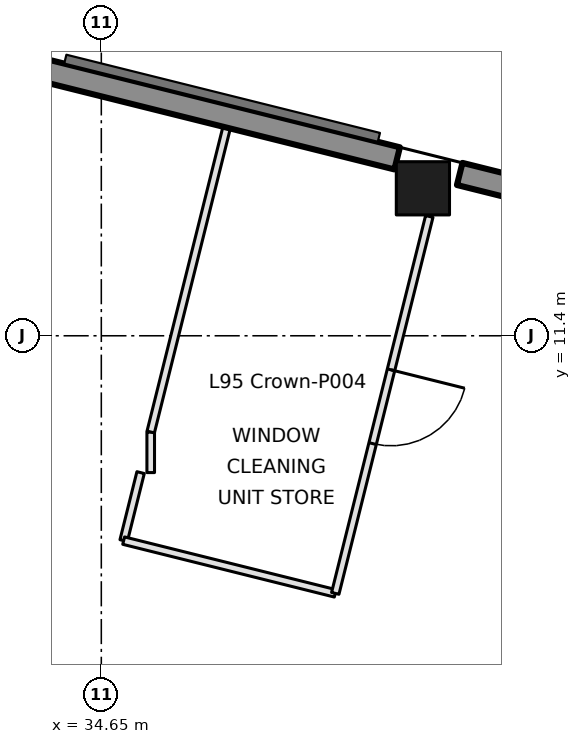
"""IFC4 building model, lengths in metres.
Left out: names, types, materials, properties, quantities, classifications, styles, units other than length and angle.
Written with IfcOpenShell. Run it as: python <this file> out.ifc"""

import sys

from ifc_helpers import new_model, si_unit, direction, frame, frame_2d, origin, origin_2d, place, context, subcontext, project, spatial, rectangle, extrude, element, fill, save


model = new_model("IFC4")
c1 = context("Model", 3, precision=1e-05, world=origin(), true_north=direction((0.0, 1.0)))
c2 = subcontext(c1, "Body", "Model", "MODEL_VIEW")
j1 = project(units=[si_unit("LENGTHUNIT", "METRE"), si_unit("PLANEANGLEUNIT", "RADIAN")], contexts=[c1])
p1 = place(None, origin())
s1 = spatial("IfcSite", under=j1, at=p1, CompositionType="ELEMENT")
p2 = place(p1, origin())
s2 = spatial("IfcBuilding", under=s1, at=p2, CompositionType="ELEMENT")
p3 = place(p2, frame((0.0, 0.0, 414.6)))
s3 = spatial("IfcBuildingStorey", under=s2, at=p3, CompositionType="ELEMENT", Elevation=414.6)
p4 = place(p3, frame((38.881, 13.34, 0.0), z_axis=(0.0, 0.0, 1.0), x_axis=(1.0, 0.0, 0.0)))
e1 = element("IfcColumn", 1, at=p4, inside=s3, PredefinedType="COLUMN", context=c2, shape_type="SweptSolid", body=[
    extrude(rectangle(XDim=0.7, YDim=0.7, at=origin_2d()), origin(), (0.0, 0.0, 1.0), 4.8),
])
p5 = place(p3, frame((37.639, -3.098, -0.3), z_axis=(0.0, 0.0, 1.0), x_axis=(0.241869030534, 0.970308905488, 0.0)))
e2 = element("IfcWall", 2, at=p5, inside=s3, PredefinedType="SHEAR", context=c2, shape_type="SweptSolid", body=[
    extrude(rectangle(XDim=10.601, YDim=0.4, at=frame_2d((5.3, 0.0))), origin(), (0.0, 0.0, 1.0), 4.65),
])
p6 = place(p5, frame((4.4, 0.0, 0.3)))
e3 = element("IfcOpeningElement", 3, at=p6, cuts=e2, PredefinedType="OPENING", context=c2, shape_type="SweptSolid", body=[
    extrude(rectangle(XDim=1.8, YDim=2.1, at=frame_2d((0.9, 1.05))), frame((0.0, 0.21, 0.0), z_axis=(0.0, -1.0, 0.0), x_axis=(1.0, 0.0, 0.0)), (0.0, 0.0, 1.0), 0.42),
])
p7 = place(p3, frame((34.944, 8.705, 0.0), z_axis=(0.0, 0.0, 1.0), x_axis=(0.241663601194, 0.97036008979, 0.0)))
e4 = element("IfcWall", 4, at=p7, inside=s3, PredefinedType="PARTITIONING", context=c2, shape_type="SweptSolid", body=[
    extrude(rectangle(XDim=0.922, YDim=0.1, at=frame_2d((0.461, 0.0))), origin(), (0.0, 0.0, 1.0), 4.35),
])
p8 = place(p3, frame((35.3, 9.6, 0.0), z_axis=(0.0, 0.0, 1.0), x_axis=(0.0, 1.0, 0.0)))
e5 = element("IfcWall", 5, at=p8, inside=s3, PredefinedType="PARTITIONING", context=c2, shape_type="SweptSolid", body=[
    extrude(rectangle(XDim=0.534, YDim=0.1, at=frame_2d((0.267, 0.0))), origin(), (0.0, 0.0, 1.0), 4.35),
])
p9 = place(p3, frame((35.3, 10.134, 0.0), z_axis=(0.0, 0.0, 1.0), x_axis=(0.24203457236, 0.970267625855, 0.0)))
e6 = element("IfcWall", 6, at=p9, inside=s3, PredefinedType="PARTITIONING", context=c2, shape_type="SweptSolid", body=[
    extrude(rectangle(XDim=4.128, YDim=0.1, at=frame_2d((2.064, 0.0))), origin(), (0.0, 0.0, 1.0), 4.35),
])
p10 = place(p3, frame((37.728, 8.011, 0.0), z_axis=(0.0, 0.0, 1.0), x_axis=(-0.970297468312, 0.241914908569, 0.0)))
e7 = element("IfcWall", 7, at=p10, inside=s3, PredefinedType="PARTITIONING", context=c2, shape_type="SweptSolid", body=[
    extrude(rectangle(XDim=2.869, YDim=0.1, at=frame_2d((1.435, 0.0))), origin(), (0.0, 0.0, 1.0), 4.35),
])
p11 = place(p3, frame((38.965, 12.97, 0.0), z_axis=(0.0, 0.0, 1.0), x_axis=(-0.24204105301, -0.970266009225, 0.0)))
e8 = element("IfcWall", 8, at=p11, inside=s3, PredefinedType="PARTITIONING", context=c2, shape_type="SweptSolid", body=[
    extrude(rectangle(XDim=5.111, YDim=0.1, at=frame_2d((2.555, 0.0))), origin(), (0.0, 0.0, 1.0), 4.35),
])
p12 = place(p11, frame((2.08, 0.0, 0.0)))
e9 = element("IfcOpeningElement", 9, at=p12, cuts=e8, PredefinedType="OPENING", context=c2, shape_type="SweptSolid", body=[
    extrude(rectangle(XDim=1.0, YDim=2.1, at=frame_2d((0.5, 1.05))), frame((0.0, 0.06, 0.0), z_axis=(0.0, -1.0, 0.0), x_axis=(1.0, 0.0, 0.0)), (0.0, 0.0, 1.0), 0.12),
])
p13 = place(p3, frame((44.072, 12.355, 0.0), z_axis=(0.0, 0.0, 1.0), x_axis=(-0.970272614069, 0.242014574744, 0.0)))
e10 = element("IfcWall", 10, at=p13, inside=s3, PredefinedType="SOLIDWALL", context=c2, shape_type="SweptSolid", body=[
    extrude(rectangle(XDim=4.851, YDim=0.3, at=frame_2d((2.426, 0.0))), origin(), (0.0, 0.0, 1.0), 3.7),
])
p14 = place(p3, frame((38.542, 13.734, 0.0), z_axis=(0.0, 0.0, 1.0), x_axis=(-0.970284401049, 0.241967314076, 0.0)))
e11 = element("IfcWall", 11, at=p14, inside=s3, PredefinedType="SOLIDWALL", context=c2, shape_type="SweptSolid", body=[
    extrude(rectangle(XDim=4.852, YDim=0.3, at=frame_2d((2.426, 0.0))), origin(), (0.0, 0.0, 1.0), 3.7),
])
p15 = place(p12, origin())
e12 = element("IfcDoor", 12, at=p15, inside=s3, OperationType="SINGLE_SWING_LEFT", PredefinedType="DOOR", context=c2, shape_type="SweptSolid", body=[
    extrude(rectangle(XDim=1.0, YDim=2.1, at=frame_2d((0.5, 1.05))), frame((0.0, 0.025, 0.0), z_axis=(0.0, -1.0, 0.0), x_axis=(1.0, 0.0, 0.0)), (0.0, 0.0, 1.0), 0.05),
])
fill(e9, e12)
save(model, sys.argv[1])
